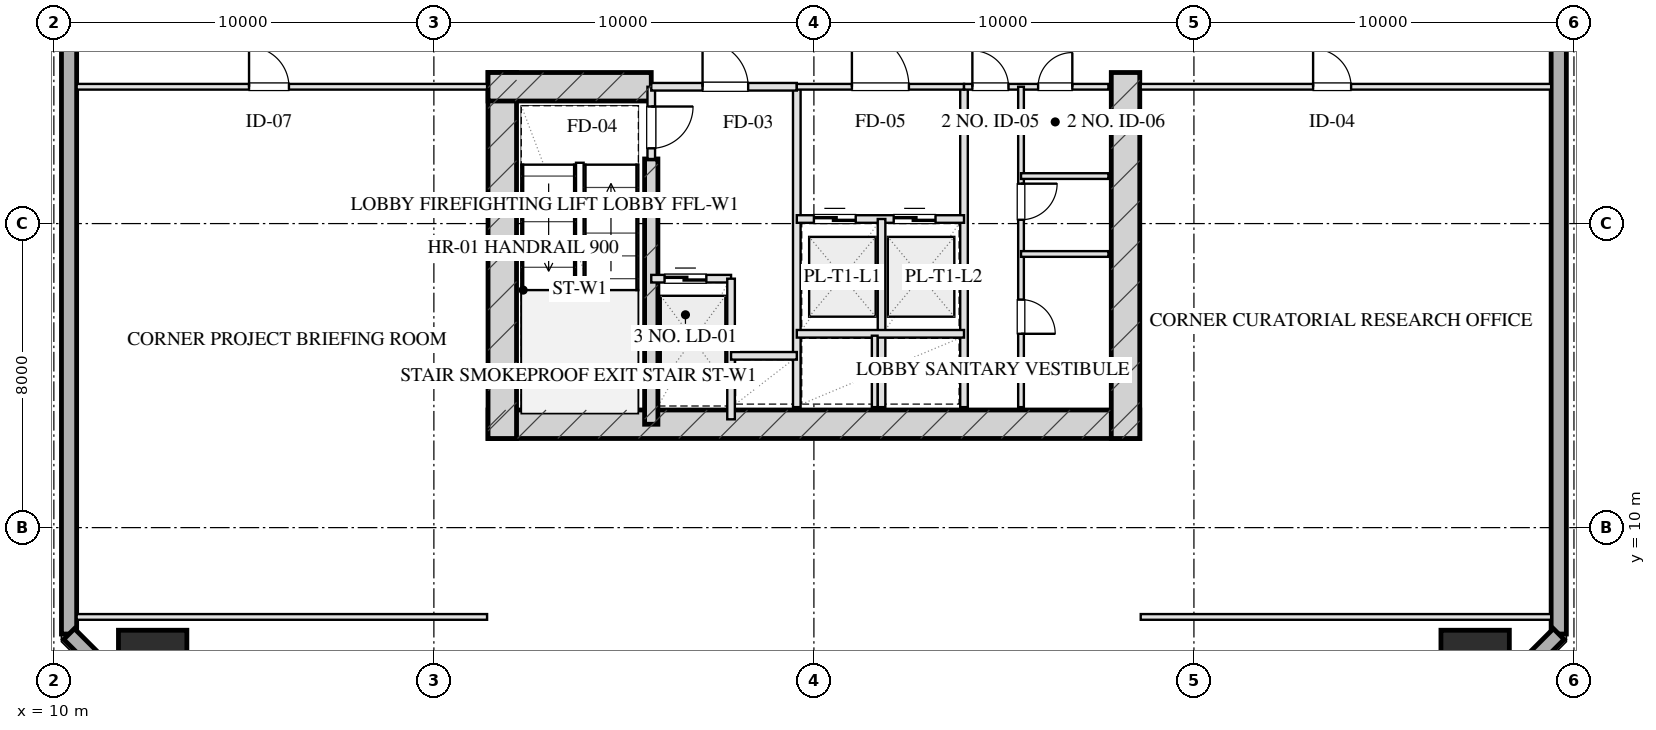
"""IFC4 building model, lengths in metres.
Left out: names, types, materials, properties, quantities, classifications, styles, units other than length and angle.
Written with IfcOpenShell. Run it as: python <this file> out.ifc"""

import sys

from ifc_helpers import new_model, si_unit, direction, frame, frame_2d, origin, origin_2d, place, context, subcontext, project, spatial, rectangle, hollow_rectangle, extrude, element, fill, save


model = new_model("IFC4")
c1 = context("Model", 3, precision=1e-05, world=origin(), true_north=direction((0.0, 1.0)))
c2 = subcontext(c1, "Body", "Model", "MODEL_VIEW")
j1 = project(units=[si_unit("LENGTHUNIT", "METRE"), si_unit("PLANEANGLEUNIT", "RADIAN")], contexts=[c1])
p1 = place(None, origin())
s1 = spatial("IfcSite", under=j1, at=p1, CompositionType="ELEMENT")
p2 = place(p1, origin())
s2 = spatial("IfcBuilding", under=s1, at=p2, CompositionType="ELEMENT")
p3 = place(p2, frame((0.0, 0.0, 42.0)))
s3 = spatial("IfcBuildingStorey", under=s2, at=p3, CompositionType="ELEMENT", Elevation=42.0)
p4 = place(p3, frame((21.425, 12.72, 0.0), z_axis=(0.0, 0.0, 1.0), x_axis=(1.0, 0.0, 0.0)))
e1 = element("IfcWall", 1, at=p4, inside=s3, PredefinedType="SHEAR", context=c2, shape_type="SweptSolid", body=[
    extrude(rectangle(XDim=17.15, YDim=0.75, at=frame_2d((8.575, 0.0))), origin(), (0.0, 0.0, 1.0), 4.0),
])
for number, where, z_axis, x_axis in (
    (2, (21.8, 21.975, 0.0), (0.0, 0.0, 1.0), (0.0, -1.0, 0.0)),
    (3, (38.2, 21.975, 0.0), (0.0, 0.0, 1.0), (0.0, -1.0, 0.0)),
):
    element("IfcWall", number, at=place(p3, frame(where, z_axis=z_axis, x_axis=x_axis)), inside=s3, PredefinedType="SHEAR", context=c2, shape_type="SweptSolid", body=[
        extrude(rectangle(XDim=9.63, YDim=0.75, at=frame_2d((4.815, 0.0))), origin(), (0.0, 0.0, 1.0), 4.0),
    ])
p5 = place(p3, frame((25.72, 19.7, 0.0), z_axis=(0.0, 0.0, 1.0), x_axis=(0.0, -1.0, 0.0)))
e4 = element("IfcWall", 4, at=p5, inside=s3, PredefinedType="SHEAR", context=c2, shape_type="SweptSolid", body=[
    extrude(rectangle(XDim=6.98, YDim=0.35, at=frame_2d((3.49, 0.0))), origin(), (0.0, 0.0, 1.0), 4.0),
])
p6 = place(p3, frame((21.425, 21.6, 0.0), z_axis=(0.0, 0.0, 1.0), x_axis=(1.0, 0.0, 0.0)))
e5 = element("IfcWall", 5, at=p6, inside=s3, PredefinedType="SHEAR", context=c2, shape_type="SweptSolid", body=[
    extrude(rectangle(XDim=4.295, YDim=0.75, at=frame_2d((2.147, 0.0))), origin(), (0.0, 0.0, 1.0), 4.0),
])
for number, where, z_axis, x_axis in (
    (6, (12.6, 6.4, 0.0), (0.0, 0.0, 1.0), (1.0, 0.0, 0.0)),
    (7, (47.4, 6.4, 0.0), (0.0, 0.0, 1.0), (1.0, 0.0, 0.0)),
):
    element("IfcColumn", number, at=place(p3, frame(where, z_axis=z_axis, x_axis=x_axis)), inside=s3, PredefinedType="COLUMN", context=c2, shape_type="SweptSolid", body=[
        extrude(hollow_rectangle(XDim=1.8, YDim=1.8, WallThickness=0.06, at=origin_2d()), origin(), (0.0, 0.0, 1.0), 4.001),
    ])
p7 = place(p3, frame((10.4, 7.2, 0.0), z_axis=(0.0, 0.0, 1.0), x_axis=(0.0, 1.0, 0.0)))
e8 = element("IfcWall", 8, at=p7, inside=s3, PredefinedType="SOLIDWALL", context=c2, shape_type="SweptSolid", body=[
    extrude(rectangle(XDim=53.6, YDim=0.4, at=frame_2d((26.8, 0.0))), origin(), (0.0, 0.0, 1.0), 3.1),
])
p8 = place(p7, frame((28.15, 0.0, 0.75)))
e9 = element("IfcOpeningElement", 9, at=p8, cuts=e8, PredefinedType="OPENING", context=c2, shape_type="SweptSolid", body=[
    extrude(rectangle(XDim=2.5, YDim=1.75, at=frame_2d((1.25, 0.875))), frame((0.0, 0.21, 0.0), z_axis=(0.0, -1.0, 0.0), x_axis=(1.0, 0.0, 0.0)), (0.0, 0.0, 1.0), 0.42),
])
p9 = place(p3, frame((49.6, 60.8, 0.0), z_axis=(0.0, 0.0, 1.0), x_axis=(0.0, -1.0, 0.0)))
e10 = element("IfcWall", 10, at=p9, inside=s3, PredefinedType="SOLIDWALL", context=c2, shape_type="SweptSolid", body=[
    extrude(rectangle(XDim=53.6, YDim=0.4, at=frame_2d((26.8, 0.0))), origin(), (0.0, 0.0, 1.0), 3.1),
])
p10 = place(p9, frame((31.95, 0.0, 0.75)))
e11 = element("IfcOpeningElement", 11, at=p10, cuts=e10, PredefinedType="OPENING", context=c2, shape_type="SweptSolid", body=[
    extrude(rectangle(XDim=2.5, YDim=1.75, at=frame_2d((1.25, 0.875))), frame((0.0, 0.21, 0.0), z_axis=(0.0, -1.0, 0.0), x_axis=(1.0, 0.0, 0.0)), (0.0, 0.0, 1.0), 0.42),
])
p11 = place(p9, frame((19.15, 0.0, 0.75)))
e12 = element("IfcOpeningElement", 12, at=p11, cuts=e10, PredefinedType="OPENING", context=c2, shape_type="SweptSolid", body=[
    extrude(rectangle(XDim=2.5, YDim=1.75, at=frame_2d((1.25, 0.875))), frame((0.0, 0.21, 0.0), z_axis=(0.0, -1.0, 0.0), x_axis=(1.0, 0.0, 0.0)), (0.0, 0.0, 1.0), 0.42),
])
for number, where, z_axis, x_axis in (
    (13, (49.6, 7.2, 0.0), (0.0, 0.0, 1.0), (-0.707, -0.707, 0.0)),
    (14, (13.4, 4.2, 0.0), (0.0, 0.0, 1.0), (-0.707, 0.707, 0.0)),
):
    element("IfcWall", number, at=place(p3, frame(where, z_axis=z_axis, x_axis=x_axis)), inside=s3, PredefinedType="SOLIDWALL", context=c2, shape_type="SweptSolid", body=[
        extrude(rectangle(XDim=4.243, YDim=0.4, at=frame_2d((2.121, 0.0))), origin(), (0.0, 0.0, 1.0), 3.1),
    ])
p12 = place(p3, frame((25.72, 21.6, 0.0), z_axis=(0.0, 0.0, 1.0), x_axis=(0.0, -1.0, 0.0)))
e15 = element("IfcWall", 15, at=p12, inside=s3, PredefinedType="PARTITIONING", context=c2, shape_type="SweptSolid", body=[
    extrude(rectangle(XDim=1.9, YDim=0.2, at=frame_2d((0.95, 0.0))), origin(), (0.0, 0.0, 1.0), 3.705),
])
p13 = place(p12, frame((0.52, 0.0, 0.0)))
e16 = element("IfcOpeningElement", 16, at=p13, cuts=e15, PredefinedType="OPENING", context=c2, shape_type="SweptSolid", body=[
    extrude(rectangle(XDim=1.1, YDim=2.05, at=frame_2d((0.55, 1.025))), frame((0.0, 0.11, 0.0), z_axis=(0.0, -1.0, 0.0), x_axis=(1.0, 0.0, 0.0)), (0.0, 0.0, 1.0), 0.22),
])
p14 = place(p3, frame((29.55, 21.6, 0.0), z_axis=(0.0, 0.0, 1.0), x_axis=(0.0, -1.0, 0.0)))
e17 = element("IfcWall", 17, at=p14, inside=s3, PredefinedType="PARTITIONING", context=c2, shape_type="SweptSolid", body=[
    extrude(rectangle(XDim=8.43, YDim=0.2, at=frame_2d((4.215, 0.0))), origin(), (0.0, 0.0, 1.0), 3.705),
])
p15 = place(p3, frame((25.72, 21.6, 0.0), z_axis=(0.0, 0.0, 1.0), x_axis=(1.0, 0.0, 0.0)))
e18 = element("IfcWall", 18, at=p15, inside=s3, PredefinedType="PARTITIONING", context=c2, shape_type="SweptSolid", body=[
    extrude(rectangle(XDim=3.83, YDim=0.2, at=frame_2d((1.915, 0.0))), origin(), (0.0, 0.0, 1.0), 3.705),
])
p16 = place(p15, frame((1.35, 0.0, 0.0)))
e19 = element("IfcOpeningElement", 19, at=p16, cuts=e18, PredefinedType="OPENING", context=c2, shape_type="SweptSolid", body=[
    extrude(rectangle(XDim=1.2, YDim=2.05, at=frame_2d((0.6, 1.025))), frame((0.0, 0.11, 0.0), z_axis=(0.0, -1.0, 0.0), x_axis=(1.0, 0.0, 0.0)), (0.0, 0.0, 1.0), 0.22),
])
p17 = place(p3, frame((25.72, 16.55, 0.0), z_axis=(0.0, 0.0, 1.0), x_axis=(1.0, 0.0, 0.0)))
e20 = element("IfcWall", 20, at=p17, inside=s3, PredefinedType="PARTITIONING", context=c2, shape_type="SweptSolid", body=[
    extrude(rectangle(XDim=2.1, YDim=0.2, at=frame_2d((1.05, 0.0))), origin(), (0.0, 0.0, 1.0), 3.705),
])
p18 = place(p17, frame((0.35, 0.0, 0.0)))
e21 = element("IfcOpeningElement", 21, at=p18, cuts=e20, PredefinedType="OPENING", context=c2, shape_type="SweptSolid", body=[
    extrude(rectangle(XDim=1.1, YDim=2.05, at=frame_2d((0.55, 1.025))), frame((0.0, 0.11, 0.0), z_axis=(0.0, -1.0, 0.0), x_axis=(1.0, 0.0, 0.0)), (0.0, 0.0, 1.0), 0.22),
])
p19 = place(p3, frame((27.82, 16.55, 0.0), z_axis=(0.0, 0.0, 1.0), x_axis=(0.0, -1.0, 0.0)))
e22 = element("IfcWall", 22, at=p19, inside=s3, PredefinedType="PARTITIONING", context=c2, shape_type="SweptSolid", body=[
    extrude(rectangle(XDim=3.7, YDim=0.2, at=frame_2d((1.85, 0.0))), origin(), (0.0, 0.0, 1.0), 3.705),
])
p20 = place(p3, frame((27.82, 14.52, 0.0), z_axis=(0.0, 0.0, 1.0), x_axis=(1.0, 0.0, 0.0)))
e23 = element("IfcWall", 23, at=p20, inside=s3, PredefinedType="PARTITIONING", context=c2, shape_type="SweptSolid", body=[
    extrude(rectangle(XDim=1.73, YDim=0.2, at=frame_2d((0.865, 0.0))), origin(), (0.0, 0.0, 1.0), 3.705),
])
p21 = place(p3, frame((33.95, 21.6, 0.0), z_axis=(0.0, 0.0, 1.0), x_axis=(0.0, -1.0, 0.0)))
e24 = element("IfcWall", 24, at=p21, inside=s3, PredefinedType="PARTITIONING", context=c2, shape_type="SweptSolid", body=[
    extrude(rectangle(XDim=8.43, YDim=0.2, at=frame_2d((4.215, 0.0))), origin(), (0.0, 0.0, 1.0), 3.705),
])
p22 = place(p3, frame((29.55, 21.6, 0.0), z_axis=(0.0, 0.0, 1.0), x_axis=(1.0, 0.0, 0.0)))
e25 = element("IfcWall", 25, at=p22, inside=s3, PredefinedType="PARTITIONING", context=c2, shape_type="SweptSolid", body=[
    extrude(rectangle(XDim=4.4, YDim=0.15, at=frame_2d((2.2, 0.0))), origin(), (0.0, 0.0, 1.0), 3.705),
])
p23 = place(p22, frame((1.45, 0.0, 0.0)))
e26 = element("IfcOpeningElement", 26, at=p23, cuts=e25, PredefinedType="OPENING", context=c2, shape_type="SweptSolid", body=[
    extrude(rectangle(XDim=1.5, YDim=2.05, at=frame_2d((0.75, 1.025))), frame((0.0, 0.085, 0.0), z_axis=(0.0, -1.0, 0.0), x_axis=(1.0, 0.0, 0.0)), (0.0, 0.0, 1.0), 0.17),
])
p24 = place(p3, frame((29.55, 18.12, 0.0), z_axis=(0.0, 0.0, 1.0), x_axis=(1.0, 0.0, 0.0)))
e27 = element("IfcWall", 27, at=p24, inside=s3, PredefinedType="PARTITIONING", context=c2, shape_type="SweptSolid", body=[
    extrude(rectangle(XDim=4.4, YDim=0.2, at=frame_2d((2.2, 0.0))), origin(), (0.0, 0.0, 1.0), 3.705),
])
p25 = place(p24, frame((0.45, 0.0, 0.0)))
e28 = element("IfcOpeningElement", 28, at=p25, cuts=e27, PredefinedType="OPENING", context=c2, shape_type="SweptSolid", body=[
    extrude(rectangle(XDim=1.1, YDim=2.05, at=frame_2d((0.55, 1.025))), frame((0.0, 0.11, 0.0), z_axis=(0.0, -1.0, 0.0), x_axis=(1.0, 0.0, 0.0)), (0.0, 0.0, 1.0), 0.22),
])
p26 = place(p24, frame((2.55, 0.0, 0.0)))
e29 = element("IfcOpeningElement", 29, at=p26, cuts=e27, PredefinedType="OPENING", context=c2, shape_type="SweptSolid", body=[
    extrude(rectangle(XDim=1.1, YDim=2.05, at=frame_2d((0.55, 1.025))), frame((0.0, 0.11, 0.0), z_axis=(0.0, -1.0, 0.0), x_axis=(1.0, 0.0, 0.0)), (0.0, 0.0, 1.0), 0.22),
])
p27 = place(p3, frame((31.78, 18.12, 0.0), z_axis=(0.0, 0.0, 1.0), x_axis=(0.0, -1.0, 0.0)))
e30 = element("IfcWall", 30, at=p27, inside=s3, PredefinedType="PARTITIONING", context=c2, shape_type="SweptSolid", body=[
    extrude(rectangle(XDim=4.95, YDim=0.2, at=frame_2d((2.475, 0.0))), origin(), (0.0, 0.0, 1.0), 3.705),
])
p28 = place(p3, frame((29.55, 15.1, 0.0), z_axis=(0.0, 0.0, 1.0), x_axis=(1.0, 0.0, 0.0)))
e31 = element("IfcWall", 31, at=p28, inside=s3, PredefinedType="PARTITIONING", context=c2, shape_type="SweptSolid", body=[
    extrude(rectangle(XDim=4.4, YDim=0.2, at=frame_2d((2.2, 0.0))), origin(), (0.0, 0.0, 1.0), 3.705),
])
p29 = place(p3, frame((31.6, 15.05, 0.0), z_axis=(0.0, 0.0, 1.0), x_axis=(0.0, -1.0, 0.0)))
e32 = element("IfcWall", 32, at=p29, inside=s3, PredefinedType="PARTITIONING", context=c2, shape_type="SweptSolid", body=[
    extrude(rectangle(XDim=1.88, YDim=0.15, at=frame_2d((0.94, 0.0))), origin(), (0.0, 0.0, 1.0), 3.705),
])
p30 = place(p3, frame((33.95, 21.6, 0.0), z_axis=(0.0, 0.0, 1.0), x_axis=(1.0, 0.0, 0.0)))
e33 = element("IfcWall", 33, at=p30, inside=s3, PredefinedType="PARTITIONING", context=c2, shape_type="SweptSolid", body=[
    extrude(rectangle(XDim=3.8, YDim=0.15, at=frame_2d((1.9, 0.0))), origin(), (0.0, 0.0, 1.0), 3.705),
])
p31 = place(p30, frame((0.22, 0.0, 0.0)))
e34 = element("IfcOpeningElement", 34, at=p31, cuts=e33, PredefinedType="OPENING", context=c2, shape_type="SweptSolid", body=[
    extrude(rectangle(XDim=0.95, YDim=2.05, at=frame_2d((0.475, 1.025))), frame((0.0, 0.085, 0.0), z_axis=(0.0, -1.0, 0.0), x_axis=(1.0, 0.0, 0.0)), (0.0, 0.0, 1.0), 0.17),
])
p32 = place(p30, frame((1.95, 0.0, 0.0)))
e35 = element("IfcOpeningElement", 35, at=p32, cuts=e33, PredefinedType="OPENING", context=c2, shape_type="SweptSolid", body=[
    extrude(rectangle(XDim=0.9, YDim=2.05, at=frame_2d((0.45, 1.025))), frame((0.0, 0.085, 0.0), z_axis=(0.0, -1.0, 0.0), x_axis=(1.0, 0.0, 0.0)), (0.0, 0.0, 1.0), 0.17),
])
p33 = place(p3, frame((35.45, 21.6, 0.0), z_axis=(0.0, 0.0, 1.0), x_axis=(0.0, -1.0, 0.0)))
e36 = element("IfcWall", 36, at=p33, inside=s3, PredefinedType="PARTITIONING", context=c2, shape_type="SweptSolid", body=[
    extrude(rectangle(XDim=8.43, YDim=0.15, at=frame_2d((4.215, 0.0))), origin(), (0.0, 0.0, 1.0), 3.345),
])
p34 = place(p33, frame((2.55, 0.0, 0.0)))
e37 = element("IfcOpeningElement", 37, at=p34, cuts=e36, PredefinedType="OPENING", context=c2, shape_type="SweptSolid", body=[
    extrude(rectangle(XDim=0.95, YDim=2.05, at=frame_2d((0.475, 1.025))), frame((0.0, 0.085, 0.0), z_axis=(0.0, -1.0, 0.0), x_axis=(1.0, 0.0, 0.0)), (0.0, 0.0, 1.0), 0.17),
])
p35 = place(p33, frame((5.6, 0.0, 0.0)))
e38 = element("IfcOpeningElement", 38, at=p35, cuts=e36, PredefinedType="OPENING", context=c2, shape_type="SweptSolid", body=[
    extrude(rectangle(XDim=0.9, YDim=2.05, at=frame_2d((0.45, 1.025))), frame((0.0, 0.085, 0.0), z_axis=(0.0, -1.0, 0.0), x_axis=(1.0, 0.0, 0.0)), (0.0, 0.0, 1.0), 0.17),
])
for number, where, z_axis, x_axis in (
    (39, (35.45, 17.2, 0.0), (0.0, 0.0, 1.0), (1.0, 0.0, 0.0)),
    (40, (35.45, 19.25, 0.0), (0.0, 0.0, 1.0), (1.0, 0.0, 0.0)),
):
    element("IfcWall", number, at=place(p3, frame(where, z_axis=z_axis, x_axis=x_axis)), inside=s3, PredefinedType="PARTITIONING", context=c2, shape_type="SweptSolid", body=[
        extrude(rectangle(XDim=2.3, YDim=0.15, at=frame_2d((1.15, 0.0))), origin(), (0.0, 0.0, 1.0), 3.705),
    ])
p36 = place(p3, frame((10.6, 7.65, 0.0), z_axis=(0.0, 0.0, 1.0), x_axis=(1.0, 0.0, 0.0)))
e41 = element("IfcWall", 41, at=p36, inside=s3, PredefinedType="PARTITIONING", context=c2, shape_type="SweptSolid", body=[
    extrude(rectangle(XDim=10.8, YDim=0.15, at=frame_2d((5.4, 0.0))), origin(), (0.0, 0.0, 1.0), 3.705),
])
p37 = place(p3, frame((10.6, 21.6, 0.0), z_axis=(0.0, 0.0, 1.0), x_axis=(1.0, 0.0, 0.0)))
e42 = element("IfcWall", 42, at=p37, inside=s3, PredefinedType="PARTITIONING", context=c2, shape_type="SweptSolid", body=[
    extrude(rectangle(XDim=10.8, YDim=0.15, at=frame_2d((5.4, 0.0))), origin(), (0.0, 0.0, 1.0), 3.705),
])
p38 = place(p37, frame((4.536, 0.0, 0.0)))
e43 = element("IfcOpeningElement", 43, at=p38, cuts=e42, PredefinedType="OPENING", context=c2, shape_type="SweptSolid", body=[
    extrude(rectangle(XDim=1.05, YDim=2.05, at=frame_2d((0.525, 1.025))), frame((0.0, 0.085, 0.0), z_axis=(0.0, -1.0, 0.0), x_axis=(1.0, 0.0, 0.0)), (0.0, 0.0, 1.0), 0.17),
])
p39 = place(p3, frame((38.6, 7.65, 0.0), z_axis=(0.0, 0.0, 1.0), x_axis=(1.0, 0.0, 0.0)))
e44 = element("IfcWall", 44, at=p39, inside=s3, PredefinedType="PARTITIONING", context=c2, shape_type="SweptSolid", body=[
    extrude(rectangle(XDim=10.8, YDim=0.15, at=frame_2d((5.4, 0.0))), origin(), (0.0, 0.0, 1.0), 3.705),
])
p40 = place(p3, frame((38.6, 21.6, 0.0), z_axis=(0.0, 0.0, 1.0), x_axis=(1.0, 0.0, 0.0)))
e45 = element("IfcWall", 45, at=p40, inside=s3, PredefinedType="PARTITIONING", context=c2, shape_type="SweptSolid", body=[
    extrude(rectangle(XDim=10.8, YDim=0.15, at=frame_2d((5.4, 0.0))), origin(), (0.0, 0.0, 1.0), 3.705),
])
p41 = place(p40, frame((4.536, 0.0, 0.0)))
e46 = element("IfcOpeningElement", 46, at=p41, cuts=e45, PredefinedType="OPENING", context=c2, shape_type="SweptSolid", body=[
    extrude(rectangle(XDim=1.0, YDim=2.05, at=frame_2d((0.5, 1.025))), frame((0.0, 0.085, 0.0), z_axis=(0.0, -1.0, 0.0), x_axis=(1.0, 0.0, 0.0)), (0.0, 0.0, 1.0), 0.17),
])
p42 = place(p13, origin())
e47 = element("IfcDoor", 47, at=p42, inside=s3, OperationType="SINGLE_SWING_LEFT", PredefinedType="DOOR", context=c2, shape_type="SweptSolid", body=[
    extrude(rectangle(XDim=1.1, YDim=2.05, at=frame_2d((0.55, 1.025))), frame((0.0, 0.025, 0.0), z_axis=(0.0, -1.0, 0.0), x_axis=(1.0, 0.0, 0.0)), (0.0, 0.0, 1.0), 0.05),
])
fill(e16, e47)
p43 = place(p16, origin())
e48 = element("IfcDoor", 48, at=p43, inside=s3, OperationType="SINGLE_SWING_LEFT", PredefinedType="DOOR", context=c2, shape_type="SweptSolid", body=[
    extrude(rectangle(XDim=1.2, YDim=2.05, at=frame_2d((0.6, 1.025))), frame((0.0, 0.025, 0.0), z_axis=(0.0, -1.0, 0.0), x_axis=(1.0, 0.0, 0.0)), (0.0, 0.0, 1.0), 0.05),
])
fill(e19, e48)
p44 = place(p18, origin())
e49 = element("IfcDoor", 49, at=p44, inside=s3, OperationType="DOUBLE_DOOR_SLIDING", PredefinedType="DOOR", context=c2, shape_type="SweptSolid", body=[
    extrude(rectangle(XDim=1.1, YDim=2.05, at=frame_2d((0.55, 1.025))), frame((0.0, 0.025, 0.0), z_axis=(0.0, -1.0, 0.0), x_axis=(1.0, 0.0, 0.0)), (0.0, 0.0, 1.0), 0.05),
])
fill(e21, e49)
p45 = place(p23, origin())
e50 = element("IfcDoor", 50, at=p45, inside=s3, OperationType="SINGLE_SWING_LEFT", PredefinedType="DOOR", context=c2, shape_type="SweptSolid", body=[
    extrude(rectangle(XDim=1.5, YDim=2.05, at=frame_2d((0.75, 1.025))), frame((0.0, 0.025, 0.0), z_axis=(0.0, -1.0, 0.0), x_axis=(1.0, 0.0, 0.0)), (0.0, 0.0, 1.0), 0.05),
])
fill(e26, e50)
p46 = place(p25, origin())
e51 = element("IfcDoor", 51, at=p46, inside=s3, OperationType="DOUBLE_DOOR_SLIDING", PredefinedType="DOOR", context=c2, shape_type="SweptSolid", body=[
    extrude(rectangle(XDim=1.1, YDim=2.05, at=frame_2d((0.55, 1.025))), frame((0.0, 0.025, 0.0), z_axis=(0.0, -1.0, 0.0), x_axis=(1.0, 0.0, 0.0)), (0.0, 0.0, 1.0), 0.05),
])
fill(e28, e51)
p47 = place(p26, origin())
e52 = element("IfcDoor", 52, at=p47, inside=s3, OperationType="DOUBLE_DOOR_SLIDING", PredefinedType="DOOR", context=c2, shape_type="SweptSolid", body=[
    extrude(rectangle(XDim=1.1, YDim=2.05, at=frame_2d((0.55, 1.025))), frame((0.0, 0.025, 0.0), z_axis=(0.0, -1.0, 0.0), x_axis=(1.0, 0.0, 0.0)), (0.0, 0.0, 1.0), 0.05),
])
fill(e29, e52)
p48 = place(p31, origin())
e53 = element("IfcDoor", 53, at=p48, inside=s3, OperationType="SINGLE_SWING_LEFT", PredefinedType="DOOR", context=c2, shape_type="SweptSolid", body=[
    extrude(rectangle(XDim=0.95, YDim=2.05, at=frame_2d((0.475, 1.025))), frame((0.0, 0.025, 0.0), z_axis=(0.0, -1.0, 0.0), x_axis=(1.0, 0.0, 0.0)), (0.0, 0.0, 1.0), 0.05),
])
fill(e34, e53)
p49 = place(p32, origin())
e54 = element("IfcDoor", 54, at=p49, inside=s3, OperationType="SINGLE_SWING_RIGHT", PredefinedType="DOOR", context=c2, shape_type="SweptSolid", body=[
    extrude(rectangle(XDim=0.9, YDim=2.05, at=frame_2d((0.45, 1.025))), frame((0.0, 0.025, 0.0), z_axis=(0.0, -1.0, 0.0), x_axis=(1.0, 0.0, 0.0)), (0.0, 0.0, 1.0), 0.05),
])
fill(e35, e54)
p50 = place(p34, origin())
e55 = element("IfcDoor", 55, at=p50, inside=s3, OperationType="SINGLE_SWING_LEFT", PredefinedType="DOOR", context=c2, shape_type="SweptSolid", body=[
    extrude(rectangle(XDim=0.95, YDim=2.05, at=frame_2d((0.475, 1.025))), frame((0.0, 0.025, 0.0), z_axis=(0.0, -1.0, 0.0), x_axis=(1.0, 0.0, 0.0)), (0.0, 0.0, 1.0), 0.05),
])
fill(e37, e55)
p51 = place(p35, origin())
e56 = element("IfcDoor", 56, at=p51, inside=s3, OperationType="SINGLE_SWING_RIGHT", PredefinedType="DOOR", context=c2, shape_type="SweptSolid", body=[
    extrude(rectangle(XDim=0.9, YDim=2.05, at=frame_2d((0.45, 1.025))), frame((0.0, 0.025, 0.0), z_axis=(0.0, -1.0, 0.0), x_axis=(1.0, 0.0, 0.0)), (0.0, 0.0, 1.0), 0.05),
])
fill(e38, e56)
p52 = place(p38, origin())
e57 = element("IfcDoor", 57, at=p52, inside=s3, OperationType="SINGLE_SWING_LEFT", PredefinedType="DOOR", context=c2, shape_type="SweptSolid", body=[
    extrude(rectangle(XDim=1.05, YDim=2.05, at=frame_2d((0.525, 1.025))), frame((0.0, 0.025, 0.0), z_axis=(0.0, -1.0, 0.0), x_axis=(1.0, 0.0, 0.0)), (0.0, 0.0, 1.0), 0.05),
])
fill(e43, e57)
p53 = place(p41, origin())
e58 = element("IfcDoor", 58, at=p53, inside=s3, OperationType="SINGLE_SWING_LEFT", PredefinedType="DOOR", context=c2, shape_type="SweptSolid", body=[
    extrude(rectangle(XDim=1.0, YDim=2.05, at=frame_2d((0.5, 1.025))), frame((0.0, 0.025, 0.0), z_axis=(0.0, -1.0, 0.0), x_axis=(1.0, 0.0, 0.0)), (0.0, 0.0, 1.0), 0.05),
])
fill(e46, e58)
save(model, sys.argv[1])
